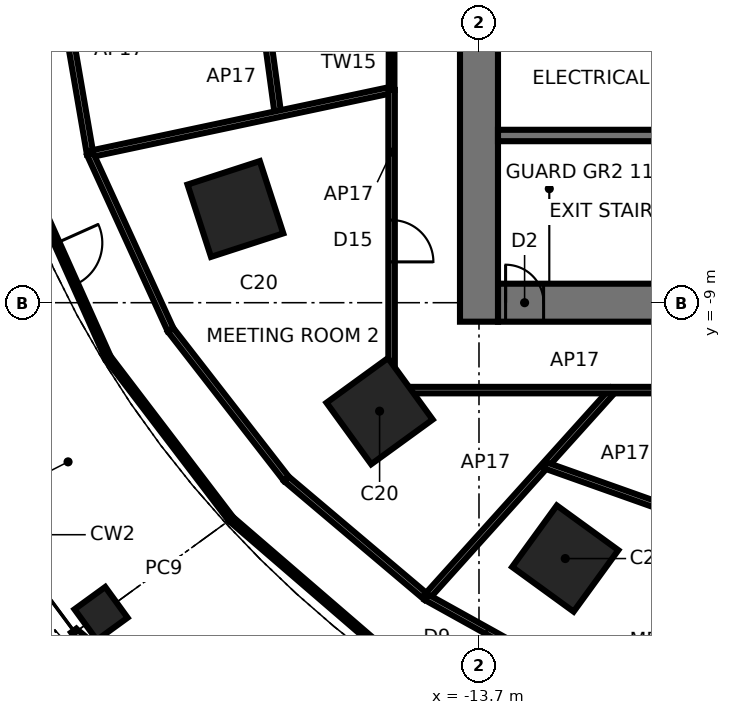
"""IFC4 building model, lengths in metres.
Left out: names, types, materials, properties, quantities, classifications, styles, units other than length and angle.
Written with IfcOpenShell. Run it as: python <this file> out.ifc"""

import sys

from ifc_helpers import new_model, si_unit, direction, frame, frame_2d, origin, origin_2d, place, context, subcontext, project, spatial, rectangle, extrude, element, fill, save


model = new_model("IFC4")
c1 = context("Model", 3, precision=1e-05, world=origin(), true_north=direction((0.0, 1.0)))
c2 = subcontext(c1, "Body", "Model", "MODEL_VIEW")
j1 = project(units=[si_unit("LENGTHUNIT", "METRE"), si_unit("PLANEANGLEUNIT", "RADIAN")], contexts=[c1])
p1 = place(None, origin())
s1 = spatial("IfcSite", under=j1, at=p1, CompositionType="ELEMENT")
p2 = place(p1, origin())
s2 = spatial("IfcBuilding", under=s1, at=p2, CompositionType="ELEMENT")
p3 = place(p2, frame((0.0, 0.0, 15.1)))
s3 = spatial("IfcBuildingStorey", under=s2, at=p3, CompositionType="ELEMENT", Elevation=15.1)
for number, where, z_axis, x_axis in (
    (1, (-20.109, -6.534, 0.0), (0.0, 0.0, 1.0), (-0.951, -0.309, 0.0)),
    (2, (-16.315, -11.854, 0.0), (0.0, 0.0, 1.0), (-0.809, -0.588, 0.0)),
    (3, (-11.43, -15.733, 0.0), (0.0, 0.0, 1.0), (-0.588, -0.809, 0.0)),
):
    element("IfcColumn", number, at=place(p3, frame(where, z_axis=z_axis, x_axis=x_axis)), inside=s3, PredefinedType="COLUMN", context=c2, shape_type="SweptSolid", body=[
        extrude(rectangle(XDim=2.0, YDim=2.0, at=origin_2d()), origin(), (0.0, 0.0, 1.0), 4.5),
    ])
p4 = place(p3, frame((-23.645, -17.179, 0.0), z_axis=(0.0, 0.0, 1.0), x_axis=(-0.809016994375, -0.587785252292, 0.0)))
e4 = element("IfcColumn", 4, at=p4, inside=s3, PredefinedType="COLUMN", context=c2, shape_type="SweptSolid", body=[
    extrude(rectangle(XDim=1.0, YDim=1.0, at=origin_2d()), origin(), (0.0, 0.0, 1.0), 4.5),
])
p5 = place(p3, frame((-13.2, -9.0, 0.0), z_axis=(0.0, 0.0, 1.0), x_axis=(1.0, 0.0, 0.0)))
e5 = element("IfcWall", 5, at=p5, inside=s3, PredefinedType="SHEAR", context=c2, shape_type="SweptSolid", body=[
    extrude(rectangle(XDim=26.4, YDim=1.0, at=frame_2d((13.2, 0.0))), origin(), (0.0, 0.0, 1.0), 4.5),
])
p6 = place(p5, frame((0.2, 0.0, 0.0)))
e6 = element("IfcOpeningElement", 6, at=p6, cuts=e5, PredefinedType="OPENING", context=c2, shape_type="SweptSolid", body=[
    extrude(rectangle(XDim=1.0, YDim=2.1, at=frame_2d((0.5, 1.05))), frame((0.0, 0.51, 0.0), z_axis=(0.0, -1.0, 0.0), x_axis=(1.0, 0.0, 0.0)), (0.0, 0.0, 1.0), 1.02),
])
p7 = place(p5, frame((9.5, 0.0, 0.0)))
e7 = element("IfcOpeningElement", 7, at=p7, cuts=e5, PredefinedType="OPENING", context=c2, shape_type="SweptSolid", body=[
    extrude(rectangle(XDim=0.9, YDim=2.1, at=frame_2d((0.45, 1.05))), frame((0.0, 0.51, 0.0), z_axis=(0.0, -1.0, 0.0), x_axis=(1.0, 0.0, 0.0)), (0.0, 0.0, 1.0), 1.02),
])
p8 = place(p5, frame((16.0, 0.0, 0.0)))
e8 = element("IfcOpeningElement", 8, at=p8, cuts=e5, PredefinedType="OPENING", context=c2, shape_type="SweptSolid", body=[
    extrude(rectangle(XDim=0.9, YDim=2.1, at=frame_2d((0.45, 1.05))), frame((0.0, 0.51, 0.0), z_axis=(0.0, -1.0, 0.0), x_axis=(1.0, 0.0, 0.0)), (0.0, 0.0, 1.0), 1.02),
])
p9 = place(p5, frame((22.85, 0.0, 0.0)))
e9 = element("IfcOpeningElement", 9, at=p9, cuts=e5, PredefinedType="OPENING", context=c2, shape_type="SweptSolid", body=[
    extrude(rectangle(XDim=0.9, YDim=2.1, at=frame_2d((0.45, 1.05))), frame((0.0, 0.51, 0.0), z_axis=(0.0, -1.0, 0.0), x_axis=(1.0, 0.0, 0.0)), (0.0, 0.0, 1.0), 1.02),
])
p10 = place(p3, frame((-13.7, 9.5, 0.0), z_axis=(0.0, 0.0, 1.0), x_axis=(0.0, -1.0, 0.0)))
e10 = element("IfcWall", 10, at=p10, inside=s3, PredefinedType="SHEAR", context=c2, shape_type="SweptSolid", body=[
    extrude(rectangle(XDim=19.0, YDim=1.0, at=frame_2d((9.5, 0.0))), origin(), (0.0, 0.0, 1.0), 4.5),
])
p11 = place(p10, frame((8.6, 0.0, 0.0)))
e11 = element("IfcOpeningElement", 11, at=p11, cuts=e10, PredefinedType="OPENING", context=c2, shape_type="SweptSolid", body=[
    extrude(rectangle(XDim=1.8, YDim=2.4, at=frame_2d((0.9, 1.2))), frame((0.0, 0.51, 0.0), z_axis=(0.0, -1.0, 0.0), x_axis=(1.0, 0.0, 0.0)), (0.0, 0.0, 1.0), 1.02),
])
p12 = place(p3, frame((-13.2, -4.6, 0.0), z_axis=(0.0, 0.0, 1.0), x_axis=(1.0, 0.0, 0.0)))
e12 = element("IfcWall", 12, at=p12, inside=s3, PredefinedType="SHEAR", context=c2, shape_type="SweptSolid", body=[
    extrude(rectangle(XDim=26.4, YDim=0.3, at=frame_2d((13.2, 0.0))), origin(), (0.0, 0.0, 1.0), 4.5),
])
p13 = place(p3, frame((-24.332, -17.678, 0.0), z_axis=(0.0, 0.0, 1.0), x_axis=(0.764694610458, -0.644392855901, 0.0)))
e13 = element("IfcWall", 13, at=p13, inside=s3, PredefinedType="SOLIDWALL", context=c2, shape_type="SweptSolid", body=[
    extrude(rectangle(XDim=6.257, YDim=0.2, at=frame_2d((3.128, 0.0))), origin(), (0.0, 0.0, 1.0), 4.3),
])
p14 = place(p13, frame((4.857, 0.0, 0.0)))
e14 = element("IfcOpeningElement", 14, at=p14, cuts=e13, PredefinedType="OPENING", context=c2, shape_type="SweptSolid", body=[
    extrude(rectangle(XDim=1.0, YDim=2.4, at=frame_2d((0.5, 1.2))), frame((0.0, 0.11, 0.0), z_axis=(0.0, -1.0, 0.0), x_axis=(1.0, 0.0, 0.0)), (0.0, 0.0, 1.0), 0.22),
])
p15 = place(p13, frame((3.757, 0.0, 0.3)))
e15 = element("IfcOpeningElement", 15, at=p15, cuts=e13, PredefinedType="OPENING", context=c2, shape_type="SweptSolid", body=[
    extrude(rectangle(XDim=0.9, YDim=2.1, at=frame_2d((0.45, 1.05))), frame((0.0, 0.11, 0.0), z_axis=(0.0, -1.0, 0.0), x_axis=(1.0, 0.0, 0.0)), (0.0, 0.0, 1.0), 0.22),
])
p16 = place(p13, frame((4.857, 0.0, 2.7)))
e16 = element("IfcOpeningElement", 16, at=p16, cuts=e13, PredefinedType="OPENING", context=c2, shape_type="SweptSolid", body=[
    extrude(rectangle(XDim=1.0, YDim=0.6, at=frame_2d((0.5, 0.3))), frame((0.0, 0.11, 0.0), z_axis=(0.0, -1.0, 0.0), x_axis=(1.0, 0.0, 0.0)), (0.0, 0.0, 1.0), 0.22),
])
p17 = place(p3, frame((-16.0, 2.481, 0.0), z_axis=(0.0, 0.0, 1.0), x_axis=(0.0, -1.0, 0.0)))
e17 = element("IfcWall", 17, at=p17, inside=s3, PredefinedType="PARTITIONING", context=c2, shape_type="SweptSolid", body=[
    extrude(rectangle(XDim=5.882, YDim=0.15, at=frame_2d((2.941, 0.0))), origin(), (0.0, 0.0, 1.0), 4.3),
])
p18 = place(p17, frame((2.316, 0.0, 0.0)))
e18 = element("IfcOpeningElement", 18, at=p18, cuts=e17, PredefinedType="OPENING", context=c2, shape_type="SweptSolid", body=[
    extrude(rectangle(XDim=1.2, YDim=2.4, at=frame_2d((0.6, 1.2))), frame((0.0, 0.085, 0.0), z_axis=(0.0, -1.0, 0.0), x_axis=(1.0, 0.0, 0.0)), (0.0, 0.0, 1.0), 0.17),
])
p19 = place(p3, frame((-23.932, -5.087, 0.0), z_axis=(0.0, 0.0, 1.0), x_axis=(-0.169704177239, 0.985495049317, 0.0)))
e19 = element("IfcWall", 19, at=p19, inside=s3, PredefinedType="PARTITIONING", context=c2, shape_type="SweptSolid", body=[
    extrude(rectangle(XDim=5.162, YDim=0.17, at=frame_2d((2.581, 0.0))), origin(), (0.0, 0.0, 1.0), 4.3),
])
p20 = place(p3, frame((-18.99, -4.036, 0.0), z_axis=(0.0, 0.0, 1.0), x_axis=(-0.135024948545, 0.990842198975, 0.0)))
e20 = element("IfcWall", 20, at=p20, inside=s3, PredefinedType="PARTITIONING", context=c2, shape_type="SweptSolid", body=[
    extrude(rectangle(XDim=4.074, YDim=0.17, at=frame_2d((2.037, 0.0))), origin(), (0.0, 0.0, 1.0), 4.3),
])
p21 = place(p3, frame((-23.932, -5.087, 0.0), z_axis=(0.0, 0.0, 1.0), x_axis=(0.97814737229, 0.20791276556, 0.0)))
e21 = element("IfcWall", 21, at=p21, inside=s3, PredefinedType="PARTITIONING", context=c2, shape_type="SweptSolid", body=[
    extrude(rectangle(XDim=8.109, YDim=0.17, at=frame_2d((4.055, 0.0))), origin(), (0.0, 0.0, 1.0), 4.3),
])
p22 = place(p3, frame((-21.816, -9.713, 0.0), z_axis=(0.0, 0.0, 1.0), x_axis=(-0.415942352912, 0.909390982501, 0.0)))
e22 = element("IfcWall", 22, at=p22, inside=s3, PredefinedType="PARTITIONING", context=c2, shape_type="SweptSolid", body=[
    extrude(rectangle(XDim=5.087, YDim=0.17, at=frame_2d((2.543, 0.0))), origin(), (0.0, 0.0, 1.0), 4.3),
])
p23 = place(p3, frame((-25.693, -5.461, 0.0), z_axis=(0.0, 0.0, 1.0), x_axis=(0.408737544403, -0.912651970795, 0.0)))
e23 = element("IfcWall", 23, at=p23, inside=s3, PredefinedType="PARTITIONING", context=c2, shape_type="SweptSolid", body=[
    extrude(rectangle(XDim=5.461, YDim=0.15, at=frame_2d((2.73, 0.0))), origin(), (0.0, 0.0, 1.0), 4.3),
])
p24 = place(p23, frame((2.156, 0.0, 0.0)))
e24 = element("IfcOpeningElement", 24, at=p24, cuts=e23, PredefinedType="OPENING", context=c2, shape_type="SweptSolid", body=[
    extrude(rectangle(XDim=1.2, YDim=2.4, at=frame_2d((0.6, 1.2))), frame((0.0, 0.085, 0.0), z_axis=(0.0, -1.0, 0.0), x_axis=(1.0, 0.0, 0.0)), (0.0, 0.0, 1.0), 0.17),
])
p25 = place(p3, frame((-16.0, -3.401, 0.0), z_axis=(0.0, 0.0, 1.0), x_axis=(0.0, -1.0, 0.0)))
e25 = element("IfcWall", 25, at=p25, inside=s3, PredefinedType="PARTITIONING", context=c2, shape_type="SweptSolid", body=[
    extrude(rectangle(XDim=7.899, YDim=0.17, at=frame_2d((3.95, 0.0))), origin(), (0.0, 0.0, 1.0), 4.3),
])
p26 = place(p25, frame((3.425, 0.0, 0.0)))
e26 = element("IfcOpeningElement", 26, at=p26, cuts=e25, PredefinedType="OPENING", context=c2, shape_type="SweptSolid", body=[
    extrude(rectangle(XDim=1.1, YDim=2.4, at=frame_2d((0.55, 1.2))), frame((0.0, 0.095, 0.0), z_axis=(0.0, -1.0, 0.0), x_axis=(1.0, 0.0, 0.0)), (0.0, 0.0, 1.0), 0.19),
])
p27 = place(p3, frame((-18.768, -13.636, 0.0), z_axis=(0.0, 0.0, 1.0), x_axis=(-0.613532245813, 0.789669667233, 0.0)))
e27 = element("IfcWall", 27, at=p27, inside=s3, PredefinedType="PARTITIONING", context=c2, shape_type="SweptSolid", body=[
    extrude(rectangle(XDim=4.968, YDim=0.17, at=frame_2d((2.484, 0.0))), origin(), (0.0, 0.0, 1.0), 4.3),
])
p28 = place(p3, frame((-23.46, -10.445, 0.0), z_axis=(0.0, 0.0, 1.0), x_axis=(0.605937156355, -0.795512515646, 0.0)))
e28 = element("IfcWall", 28, at=p28, inside=s3, PredefinedType="PARTITIONING", context=c2, shape_type="SweptSolid", body=[
    extrude(rectangle(XDim=5.341, YDim=0.15, at=frame_2d((2.67, 0.0))), origin(), (0.0, 0.0, 1.0), 4.3),
])
p29 = place(p3, frame((-15.082, -16.75, 0.0), z_axis=(0.0, 0.0, 1.0), x_axis=(-0.763840902497, 0.645404582935, 0.0)))
e29 = element("IfcWall", 29, at=p29, inside=s3, PredefinedType="PARTITIONING", context=c2, shape_type="SweptSolid", body=[
    extrude(rectangle(XDim=4.826, YDim=0.17, at=frame_2d((2.413, 0.0))), origin(), (0.0, 0.0, 1.0), 4.3),
])
p30 = place(p3, frame((-20.224, -14.694, 0.0), z_axis=(0.0, 0.0, 1.0), x_axis=(0.757397147913, -0.652954485652, 0.0)))
e30 = element("IfcWall", 30, at=p30, inside=s3, PredefinedType="PARTITIONING", context=c2, shape_type="SweptSolid", body=[
    extrude(rectangle(XDim=5.199, YDim=0.15, at=frame_2d((2.599, 0.0))), origin(), (0.0, 0.0, 1.0), 4.3),
])
p31 = place(p3, frame((-10.175, -11.3, 0.0), z_axis=(0.0, 0.0, 1.0), x_axis=(-0.669139425, -0.743136885043, 0.0)))
e31 = element("IfcWall", 31, at=p31, inside=s3, PredefinedType="PARTITIONING", context=c2, shape_type="SweptSolid", body=[
    extrude(rectangle(XDim=7.334, YDim=0.17, at=frame_2d((3.667, 0.0))), origin(), (0.0, 0.0, 1.0), 4.3),
])
p32 = place(p3, frame((-8.397, -14.544, 0.0), z_axis=(0.0, 0.0, 1.0), x_axis=(-0.942296263641, 0.334780154023, 0.0)))
e32 = element("IfcWall", 32, at=p32, inside=s3, PredefinedType="PARTITIONING", context=c2, shape_type="SweptSolid", body=[
    extrude(rectangle(XDim=3.778, YDim=0.17, at=frame_2d((1.889, 0.0))), origin(), (0.0, 0.0, 1.0), 4.3),
])
p33 = place(p3, frame((-10.986, -19.028, 0.0), z_axis=(0.0, 0.0, 1.0), x_axis=(-0.873972942057, 0.485974584266, 0.0)))
e33 = element("IfcWall", 33, at=p33, inside=s3, PredefinedType="PARTITIONING", context=c2, shape_type="SweptSolid", body=[
    extrude(rectangle(XDim=4.687, YDim=0.17, at=frame_2d((2.344, 0.0))), origin(), (0.0, 0.0, 1.0), 4.3),
])
p34 = place(p33, frame((1.768, 0.0, 0.0)))
e34 = element("IfcOpeningElement", 34, at=p34, cuts=e33, PredefinedType="OPENING", context=c2, shape_type="SweptSolid", body=[
    extrude(rectangle(XDim=1.1, YDim=2.4, at=frame_2d((0.55, 1.2))), frame((0.0, 0.095, 0.0), z_axis=(0.0, -1.0, 0.0), x_axis=(1.0, 0.0, 0.0)), (0.0, 0.0, 1.0), 0.19),
])
p35 = place(p3, frame((-16.0, -11.3, 0.0), z_axis=(0.0, 0.0, 1.0), x_axis=(1.0, 0.0, 0.0)))
e35 = element("IfcWall", 35, at=p35, inside=s3, PredefinedType="PARTITIONING", context=c2, shape_type="SweptSolid", body=[
    extrude(rectangle(XDim=22.524, YDim=0.17, at=frame_2d((11.262, 0.0))), origin(), (0.0, 0.0, 1.0), 4.3),
])
p36 = place(p35, frame((18.118, 0.0, 0.0)))
e36 = element("IfcOpeningElement", 36, at=p36, cuts=e35, PredefinedType="OPENING", context=c2, shape_type="SweptSolid", body=[
    extrude(rectangle(XDim=1.1, YDim=2.4, at=frame_2d((0.55, 1.2))), frame((0.0, 0.095, 0.0), z_axis=(0.0, -1.0, 0.0), x_axis=(1.0, 0.0, 0.0)), (0.0, 0.0, 1.0), 0.19),
])
p37 = place(p35, frame((9.794, 0.0, 0.0)))
e37 = element("IfcOpeningElement", 37, at=p37, cuts=e35, PredefinedType="OPENING", context=c2, shape_type="SweptSolid", body=[
    extrude(rectangle(XDim=1.0, YDim=2.4, at=frame_2d((0.5, 1.2))), frame((0.0, 0.095, 0.0), z_axis=(0.0, -1.0, 0.0), x_axis=(1.0, 0.0, 0.0)), (0.0, 0.0, 1.0), 0.19),
])
p38 = place(p6, origin())
e38 = element("IfcDoor", 38, at=p38, inside=s3, OperationType="SINGLE_SWING_LEFT", PredefinedType="DOOR", context=c2, shape_type="SweptSolid", body=[
    extrude(rectangle(XDim=0.92, YDim=2.06, at=frame_2d((0.5, 1.03))), frame((0.0, 0.025, 0.0), z_axis=(0.0, -1.0, 0.0), x_axis=(1.0, 0.0, 0.0)), (0.0, 0.0, 1.0), 0.05),
    extrude(rectangle(XDim=0.04, YDim=2.1, at=frame_2d((0.02, 1.05))), frame((0.0, 0.25, 0.0), z_axis=(0.0, -1.0, 0.0), x_axis=(1.0, 0.0, 0.0)), (0.0, 0.0, 1.0), 0.5),
    extrude(rectangle(XDim=0.04, YDim=2.1, at=frame_2d((0.98, 1.05))), frame((0.0, 0.25, 0.0), z_axis=(0.0, -1.0, 0.0), x_axis=(1.0, 0.0, 0.0)), (0.0, 0.0, 1.0), 0.5),
    extrude(rectangle(XDim=0.92, YDim=0.04, at=frame_2d((0.5, 2.08))), frame((0.0, 0.25, 0.0), z_axis=(0.0, -1.0, 0.0), x_axis=(1.0, 0.0, 0.0)), (0.0, 0.0, 1.0), 0.5),
])
fill(e6, e38)
p39 = place(p26, origin())
e39 = element("IfcDoor", 39, at=p39, inside=s3, OperationType="SINGLE_SWING_RIGHT", PredefinedType="DOOR", context=c2, shape_type="SweptSolid", body=[
    extrude(rectangle(XDim=1.1, YDim=2.4, at=frame_2d((0.55, 1.2))), frame((0.0, 0.025, 0.0), z_axis=(0.0, -1.0, 0.0), x_axis=(1.0, 0.0, 0.0)), (0.0, 0.0, 1.0), 0.05),
])
fill(e26, e39)
p40 = place(p34, origin())
e40 = element("IfcDoor", 40, at=p40, inside=s3, OperationType="SINGLE_SWING_RIGHT", PredefinedType="DOOR", context=c2, shape_type="SweptSolid", body=[
    extrude(rectangle(XDim=1.1, YDim=2.4, at=frame_2d((0.55, 1.2))), frame((0.0, 0.025, 0.0), z_axis=(0.0, -1.0, 0.0), x_axis=(1.0, 0.0, 0.0)), (0.0, 0.0, 1.0), 0.05),
])
fill(e34, e40)
p41 = place(p24, origin())
e41 = element("IfcDoor", 41, at=p41, inside=s3, OperationType="SINGLE_SWING_LEFT", PredefinedType="DOOR", context=c2, shape_type="SweptSolid", body=[
    extrude(rectangle(XDim=1.2, YDim=2.4, at=frame_2d((0.6, 1.2))), frame((0.0, 0.025, 0.0), z_axis=(0.0, -1.0, 0.0), x_axis=(1.0, 0.0, 0.0)), (0.0, 0.0, 1.0), 0.05),
])
fill(e24, e41)
save(model, sys.argv[1])
